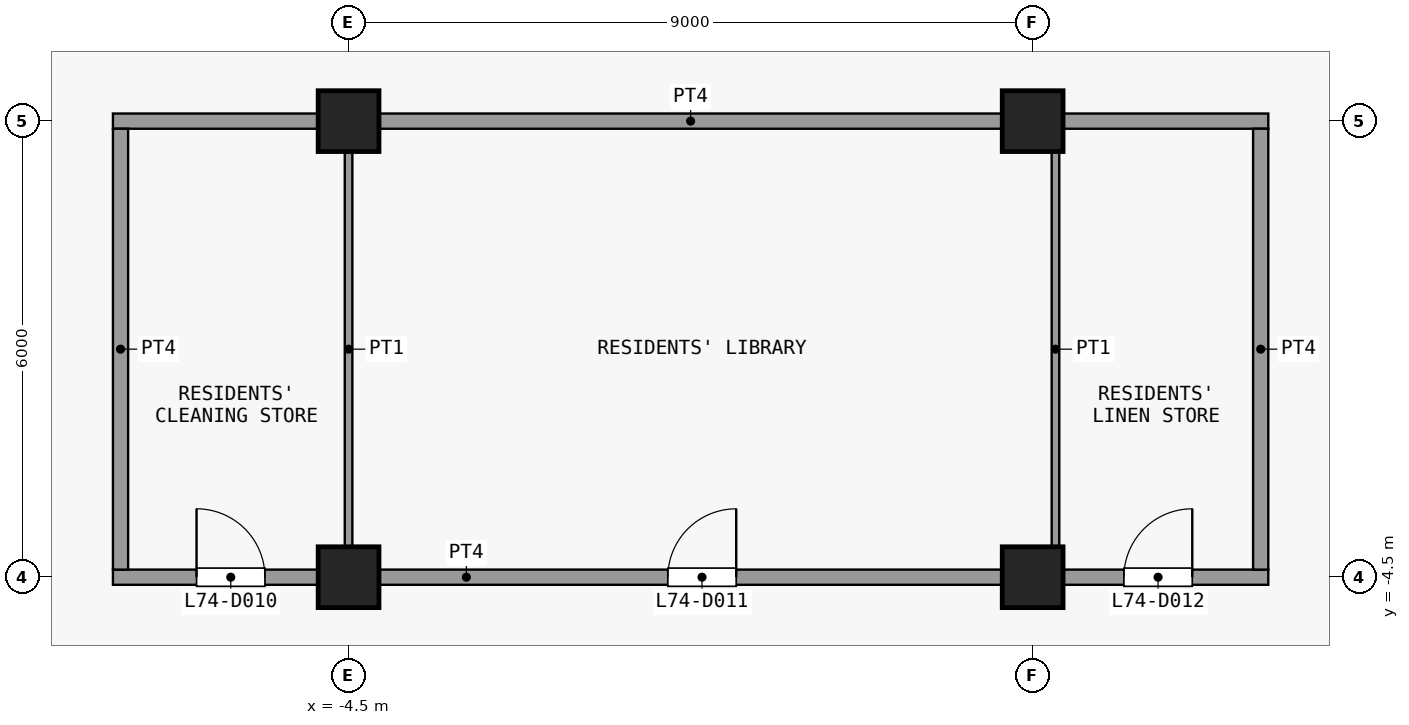
"""IFC4 building model, lengths in metres.
Left out: names, types, materials, properties, quantities, classifications, styles, units other than length and angle.
Written with IfcOpenShell. Run it as: python <this file> out.ifc"""

import sys

from ifc_helpers import new_model, si_unit, direction, frame, frame_2d, origin, origin_2d, place, context, subcontext, project, spatial, rectangle, extrude, element, fill, save


model = new_model("IFC4")
c1 = context("Model", 3, precision=1e-05, world=origin(), true_north=direction((0.0, 1.0)))
c2 = subcontext(c1, "Body", "Model", "MODEL_VIEW")
j1 = project(units=[si_unit("LENGTHUNIT", "METRE"), si_unit("PLANEANGLEUNIT", "RADIAN")], contexts=[c1])
p1 = place(None, origin())
s1 = spatial("IfcSite", under=j1, at=p1, CompositionType="ELEMENT")
p2 = place(p1, origin())
s2 = spatial("IfcBuilding", under=s1, at=p2, CompositionType="ELEMENT")
p3 = place(p2, frame((0.0, 0.0, 291.5)))
s3 = spatial("IfcBuildingStorey", under=s2, at=p3, CompositionType="ELEMENT", Elevation=291.5)
for number, where, z_axis, x_axis in (
    (1, (-4.5, -4.5, 0.0), (0.0, 0.0, 1.0), (1.0, 0.0, 0.0)),
    (2, (-4.5, 1.5, 0.0), (0.0, 0.0, 1.0), (1.0, 0.0, 0.0)),
    (3, (4.5, -4.5, 0.0), (0.0, 0.0, 1.0), (1.0, 0.0, 0.0)),
    (4, (4.5, 1.5, 0.0), (0.0, 0.0, 1.0), (1.0, 0.0, 0.0)),
):
    element("IfcColumn", number, at=place(p3, frame(where, z_axis=z_axis, x_axis=x_axis)), inside=s3, PredefinedType="COLUMN", context=c2, shape_type="SweptSolid", body=[
        extrude(rectangle(XDim=0.8, YDim=0.8, at=origin_2d()), origin(), (0.0, 0.0, 1.0), 3.6),
    ])
p4 = place(p3, frame((-7.6, -4.5, 0.0), z_axis=(0.0, 0.0, 1.0), x_axis=(1.0, 0.0, 0.0)))
e5 = element("IfcWall", 5, at=p4, inside=s3, PredefinedType="PARTITIONING", context=c2, shape_type="SweptSolid", body=[
    extrude(rectangle(XDim=15.2, YDim=0.2, at=frame_2d((7.6, 0.0))), origin(), (0.0, 0.0, 1.0), 3.3),
])
p5 = place(p4, frame((1.1, 0.0, 0.0)))
e6 = element("IfcOpeningElement", 6, at=p5, cuts=e5, PredefinedType="OPENING", context=c2, shape_type="SweptSolid", body=[
    extrude(rectangle(XDim=0.9, YDim=2.1, at=frame_2d((0.45, 1.05))), frame((0.0, 0.11, 0.0), z_axis=(0.0, -1.0, 0.0), x_axis=(1.0, 0.0, 0.0)), (0.0, 0.0, 1.0), 0.22),
])
p6 = place(p4, frame((7.3, 0.0, 0.0)))
e7 = element("IfcOpeningElement", 7, at=p6, cuts=e5, PredefinedType="OPENING", context=c2, shape_type="SweptSolid", body=[
    extrude(rectangle(XDim=0.9, YDim=2.1, at=frame_2d((0.45, 1.05))), frame((0.0, 0.11, 0.0), z_axis=(0.0, -1.0, 0.0), x_axis=(1.0, 0.0, 0.0)), (0.0, 0.0, 1.0), 0.22),
])
p7 = place(p4, frame((13.3, 0.0, 0.0)))
e8 = element("IfcOpeningElement", 8, at=p7, cuts=e5, PredefinedType="OPENING", context=c2, shape_type="SweptSolid", body=[
    extrude(rectangle(XDim=0.9, YDim=2.1, at=frame_2d((0.45, 1.05))), frame((0.0, 0.11, 0.0), z_axis=(0.0, -1.0, 0.0), x_axis=(1.0, 0.0, 0.0)), (0.0, 0.0, 1.0), 0.22),
])
p8 = place(p3, frame((-7.6, 1.5, 0.0), z_axis=(0.0, 0.0, 1.0), x_axis=(1.0, 0.0, 0.0)))
e9 = element("IfcWall", 9, at=p8, inside=s3, PredefinedType="PARTITIONING", context=c2, shape_type="SweptSolid", body=[
    extrude(rectangle(XDim=15.2, YDim=0.2, at=frame_2d((7.6, 0.0))), origin(), (0.0, 0.0, 1.0), 3.3),
])
p9 = place(p3, frame((-7.5, -4.4, 0.0), z_axis=(0.0, 0.0, 1.0), x_axis=(0.0, 1.0, 0.0)))
e10 = element("IfcWall", 10, at=p9, inside=s3, PredefinedType="PARTITIONING", context=c2, shape_type="SweptSolid", body=[
    extrude(rectangle(XDim=5.8, YDim=0.2, at=frame_2d((2.9, 0.0))), origin(), (0.0, 0.0, 1.0), 3.3),
])
for number, where, z_axis, x_axis in (
    (11, (-4.5, -4.4, 0.0), (0.0, 0.0, 1.0), (0.0, 1.0, 0.0)),
    (12, (4.8, -4.4, 0.0), (0.0, 0.0, 1.0), (0.0, 1.0, 0.0)),
):
    element("IfcWall", number, at=place(p3, frame(where, z_axis=z_axis, x_axis=x_axis)), inside=s3, PredefinedType="PARTITIONING", context=c2, shape_type="SweptSolid", body=[
        extrude(rectangle(XDim=5.8, YDim=0.1, at=frame_2d((2.9, 0.0))), origin(), (0.0, 0.0, 1.0), 3.3),
    ])
p10 = place(p3, frame((7.5, -4.4, 0.0), z_axis=(0.0, 0.0, 1.0), x_axis=(0.0, 1.0, 0.0)))
e13 = element("IfcWall", 13, at=p10, inside=s3, PredefinedType="PARTITIONING", context=c2, shape_type="SweptSolid", body=[
    extrude(rectangle(XDim=5.8, YDim=0.2, at=frame_2d((2.9, 0.0))), origin(), (0.0, 0.0, 1.0), 3.3),
])
p11 = place(p5, origin())
e14 = element("IfcDoor", 14, at=p11, inside=s3, OperationType="SINGLE_SWING_RIGHT", PredefinedType="DOOR", context=c2, shape_type="SweptSolid", body=[
    extrude(rectangle(XDim=0.9, YDim=2.1, at=frame_2d((0.45, 1.05))), frame((0.0, 0.025, 0.0), z_axis=(0.0, -1.0, 0.0), x_axis=(1.0, 0.0, 0.0)), (0.0, 0.0, 1.0), 0.05),
])
fill(e6, e14)
p12 = place(p6, origin())
e15 = element("IfcDoor", 15, at=p12, inside=s3, OperationType="SINGLE_SWING_LEFT", PredefinedType="DOOR", context=c2, shape_type="SweptSolid", body=[
    extrude(rectangle(XDim=0.9, YDim=2.1, at=frame_2d((0.45, 1.05))), frame((0.0, 0.025, 0.0), z_axis=(0.0, -1.0, 0.0), x_axis=(1.0, 0.0, 0.0)), (0.0, 0.0, 1.0), 0.05),
])
fill(e7, e15)
p13 = place(p7, origin())
e16 = element("IfcDoor", 16, at=p13, inside=s3, OperationType="SINGLE_SWING_LEFT", PredefinedType="DOOR", context=c2, shape_type="SweptSolid", body=[
    extrude(rectangle(XDim=0.9, YDim=2.1, at=frame_2d((0.45, 1.05))), frame((0.0, 0.025, 0.0), z_axis=(0.0, -1.0, 0.0), x_axis=(1.0, 0.0, 0.0)), (0.0, 0.0, 1.0), 0.05),
])
fill(e8, e16)
save(model, sys.argv[1])
